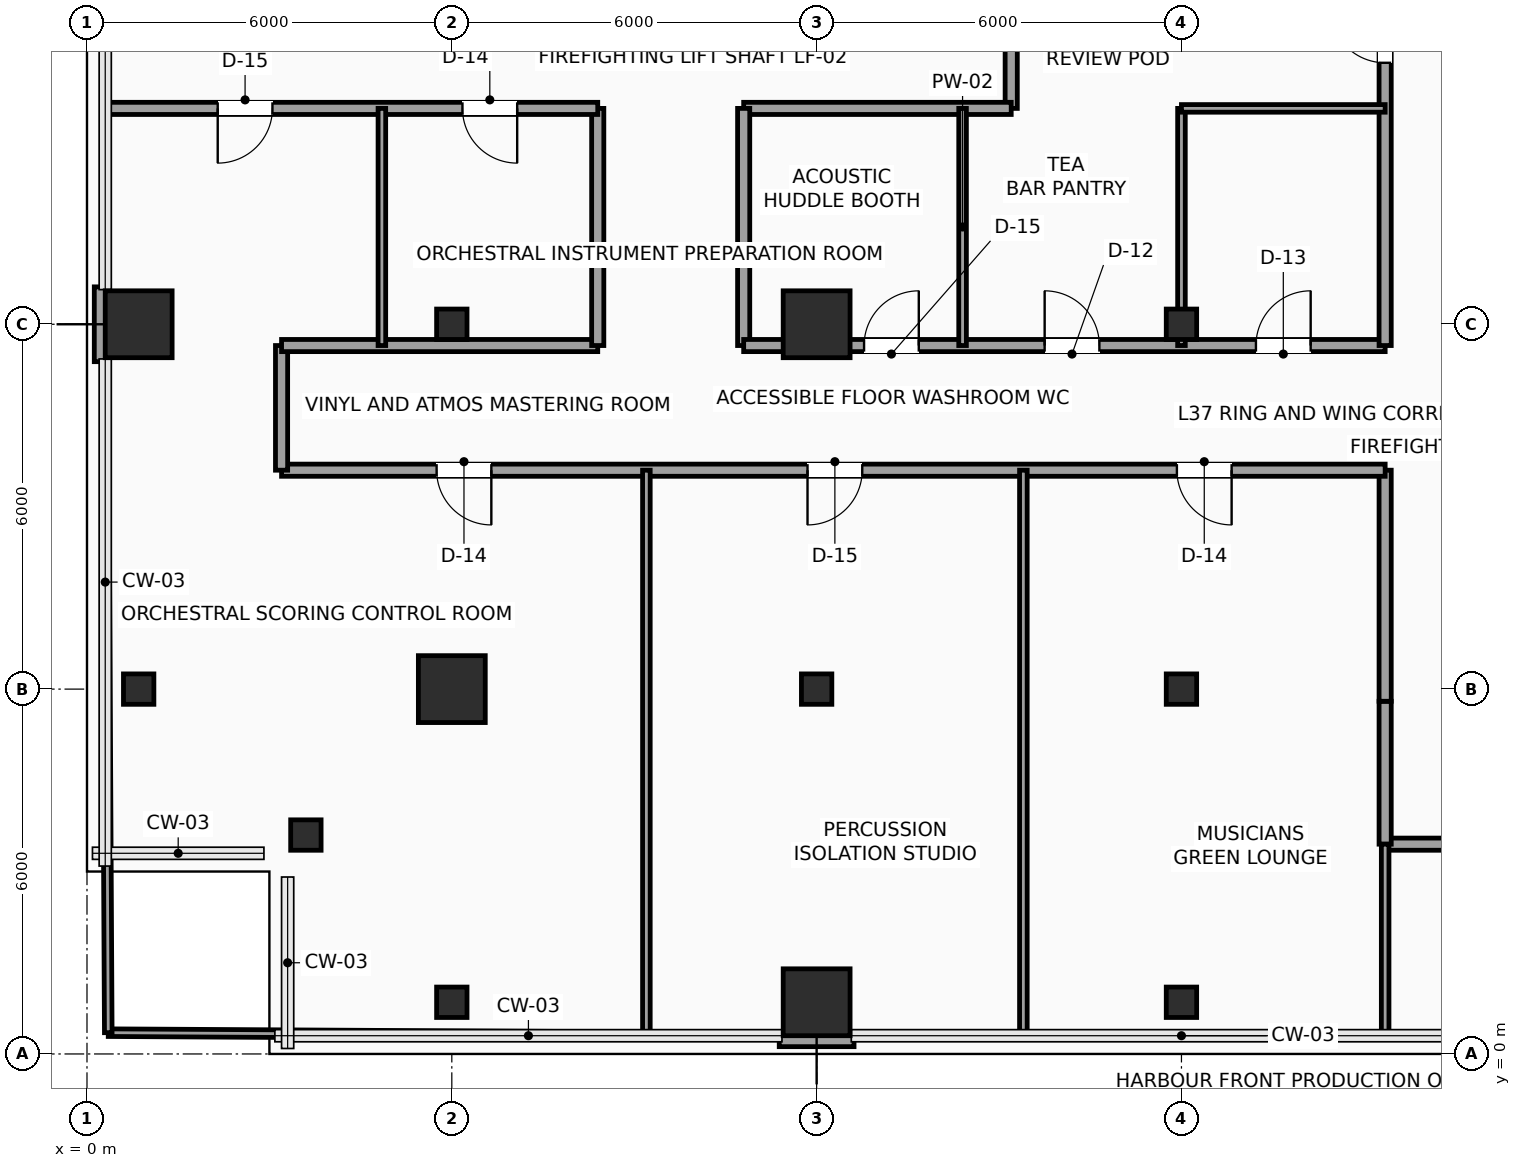
"""IFC4 building model, lengths in metres.
Left out: names, types, materials, properties, quantities, classifications, styles, units other than length and angle.
Written with IfcOpenShell. Run it as: python <this file> out.ifc"""

import sys

from ifc_helpers import new_model, si_unit, direction, frame, frame_2d, origin, origin_2d, place, context, subcontext, project, spatial, rectangle, hollow_rectangle, extrude, element, fill, save


model = new_model("IFC4")
c1 = context("Model", 3, precision=1e-05, world=origin(), true_north=direction((0.0, 1.0)))
c2 = subcontext(c1, "Body", "Model", "MODEL_VIEW")
j1 = project(units=[si_unit("LENGTHUNIT", "METRE"), si_unit("PLANEANGLEUNIT", "RADIAN")], contexts=[c1])
p1 = place(None, origin())
s1 = spatial("IfcSite", under=j1, at=p1, CompositionType="ELEMENT")
p2 = place(p1, origin())
s2 = spatial("IfcBuilding", under=s1, at=p2, CompositionType="ELEMENT")
p3 = place(p2, frame((0.0, 0.0, 153.15)))
s3 = spatial("IfcBuildingStorey", under=s2, at=p3, CompositionType="ELEMENT", Elevation=153.15)
for number, where, z_axis, x_axis in (
    (1, (3.6, 3.6, 0.0), (0.0, 0.0, 1.0), (1.0, 0.0, 0.0)),
    (2, (0.85, 6.0, 0.0), (0.0, 0.0, 1.0), (1.0, 0.0, 0.0)),
):
    element("IfcColumn", number, at=place(p3, frame(where, z_axis=z_axis, x_axis=x_axis)), inside=s3, PredefinedType="COLUMN", context=c2, shape_type="SweptSolid", body=[
        extrude(hollow_rectangle(XDim=0.5, YDim=0.5, WallThickness=0.025, InnerFilletRadius=0.025, OuterFilletRadius=0.04, at=origin_2d()), origin(), (0.0, 0.0, 1.0), 3.75),
    ])
p4 = place(p3, frame((0.85, 12.0, 0.0), z_axis=(0.0, 0.0, 1.0), x_axis=(1.0, 0.0, 0.0)))
e3 = element("IfcColumn", 3, at=p4, inside=s3, PredefinedType="COLUMN", context=c2, shape_type="SweptSolid", body=[
    extrude(rectangle(XDim=1.1, YDim=1.1, at=origin_2d()), origin(), (0.0, 0.0, 1.0), 3.75),
])
p5 = place(p3, frame((6.0, 0.85, 0.0), z_axis=(0.0, 0.0, 1.0), x_axis=(1.0, 0.0, 0.0)))
e4 = element("IfcColumn", 4, at=p5, inside=s3, PredefinedType="COLUMN", context=c2, shape_type="SweptSolid", body=[
    extrude(hollow_rectangle(XDim=0.5, YDim=0.5, WallThickness=0.025, InnerFilletRadius=0.025, OuterFilletRadius=0.04, at=origin_2d()), origin(), (0.0, 0.0, 1.0), 3.75),
])
p6 = place(p3, frame((6.0, 6.0, 0.0), z_axis=(0.0, 0.0, 1.0), x_axis=(1.0, 0.0, 0.0)))
e5 = element("IfcColumn", 5, at=p6, inside=s3, PredefinedType="COLUMN", context=c2, shape_type="SweptSolid", body=[
    extrude(rectangle(XDim=1.1, YDim=1.1, at=origin_2d()), origin(), (0.0, 0.0, 1.0), 3.75),
])
p7 = place(p3, frame((6.0, 12.0, 0.0), z_axis=(0.0, 0.0, 1.0), x_axis=(1.0, 0.0, 0.0)))
e6 = element("IfcColumn", 6, at=p7, inside=s3, PredefinedType="COLUMN", context=c2, shape_type="SweptSolid", body=[
    extrude(hollow_rectangle(XDim=0.5, YDim=0.5, WallThickness=0.025, InnerFilletRadius=0.025, OuterFilletRadius=0.04, at=origin_2d()), origin(), (0.0, 0.0, 1.0), 3.75),
])
p8 = place(p3, frame((12.0, 0.85, 0.0), z_axis=(0.0, 0.0, 1.0), x_axis=(1.0, 0.0, 0.0)))
e7 = element("IfcColumn", 7, at=p8, inside=s3, PredefinedType="COLUMN", context=c2, shape_type="SweptSolid", body=[
    extrude(rectangle(XDim=1.1, YDim=1.1, at=origin_2d()), origin(), (0.0, 0.0, 1.0), 3.75),
])
p9 = place(p3, frame((12.0, 6.0, 0.0), z_axis=(0.0, 0.0, 1.0), x_axis=(1.0, 0.0, 0.0)))
e8 = element("IfcColumn", 8, at=p9, inside=s3, PredefinedType="COLUMN", context=c2, shape_type="SweptSolid", body=[
    extrude(hollow_rectangle(XDim=0.5, YDim=0.5, WallThickness=0.025, InnerFilletRadius=0.025, OuterFilletRadius=0.04, at=origin_2d()), origin(), (0.0, 0.0, 1.0), 3.75),
])
p10 = place(p3, frame((12.0, 12.0, 0.0), z_axis=(0.0, 0.0, 1.0), x_axis=(1.0, 0.0, 0.0)))
e9 = element("IfcColumn", 9, at=p10, inside=s3, PredefinedType="COLUMN", context=c2, shape_type="SweptSolid", body=[
    extrude(rectangle(XDim=1.1, YDim=1.1, at=origin_2d()), origin(), (0.0, 0.0, 1.0), 3.75),
])
for number, where, z_axis, x_axis in (
    (10, (18.0, 0.85, 0.0), (0.0, 0.0, 1.0), (1.0, 0.0, 0.0)),
    (11, (18.0, 6.0, 0.0), (0.0, 0.0, 1.0), (1.0, 0.0, 0.0)),
    (12, (18.0, 12.0, 0.0), (0.0, 0.0, 1.0), (1.0, 0.0, 0.0)),
):
    element("IfcColumn", number, at=place(p3, frame(where, z_axis=z_axis, x_axis=x_axis)), inside=s3, PredefinedType="COLUMN", context=c2, shape_type="SweptSolid", body=[
        extrude(hollow_rectangle(XDim=0.5, YDim=0.5, WallThickness=0.025, InnerFilletRadius=0.025, OuterFilletRadius=0.04, at=origin_2d()), origin(), (0.0, 0.0, 1.0), 3.75),
    ])
for number, where, z_axis, x_axis in (
    (13, (0.24, 11.385, 0.0), (0.0, 0.0, 1.0), (0.0, 1.0, 0.0)),
    (14, (12.615, 0.24, 0.0), (0.0, 0.0, 1.0), (-1.0, 0.0, 0.0)),
):
    element("IfcWall", number, at=place(p3, frame(where, z_axis=z_axis, x_axis=x_axis)), inside=s3, PredefinedType="SOLIDWALL", context=c2, shape_type="SweptSolid", body=[
        extrude(rectangle(XDim=1.23, YDim=0.24, at=frame_2d((0.615, 0.0))), origin(), (0.0, 0.0, 1.0), 3.525),
    ])
p11 = place(p3, frame((23.95, 3.45, 0.0), z_axis=(0.0, 0.0, 1.0), x_axis=(-1.0, 0.0, 0.0)))
e15 = element("IfcWall", 15, at=p11, inside=s3, PredefinedType="SOLIDWALL", context=c2, shape_type="SweptSolid", body=[
    extrude(rectangle(XDim=2.6, YDim=0.2, at=frame_2d((1.3, 0.0))), origin(), (0.0, 0.0, 1.0), 3.067),
])
p12 = place(p3, frame((21.35, 3.45, 0.0), z_axis=(0.0, 0.0, 1.0), x_axis=(0.0, 1.0, 0.0)))
e16 = element("IfcWall", 16, at=p12, inside=s3, PredefinedType="SOLIDWALL", context=c2, shape_type="SweptSolid", body=[
    extrude(rectangle(XDim=2.35, YDim=0.2, at=frame_2d((1.175, 0.0))), origin(), (0.0, 0.0, 1.0), 3.525),
])
p13 = place(p3, frame((21.35, 5.8, 0.0), z_axis=(0.0, 0.0, 1.0), x_axis=(0.0, 1.0, 0.0)))
e17 = element("IfcWall", 17, at=p13, inside=s3, PredefinedType="SOLIDWALL", context=c2, shape_type="SweptSolid", body=[
    extrude(rectangle(XDim=3.8, YDim=0.2, at=frame_2d((1.9, 0.0))), origin(), (0.0, 0.0, 1.0), 3.525),
])
p14 = place(p3, frame((21.35, 9.6, 0.0), z_axis=(0.0, 0.0, 1.0), x_axis=(-1.0, 0.0, 0.0)))
e18 = element("IfcWall", 18, at=p14, inside=s3, PredefinedType="SOLIDWALL", context=c2, shape_type="SweptSolid", body=[
    extrude(rectangle(XDim=18.15, YDim=0.2, at=frame_2d((9.075, 0.0))), origin(), (0.0, 0.0, 1.0), 3.525),
])
p15 = place(p14, frame((14.7, 0.0, 0.0)))
e19 = element("IfcOpeningElement", 19, at=p15, cuts=e18, PredefinedType="OPENING", context=c2, shape_type="SweptSolid", body=[
    extrude(rectangle(XDim=0.9, YDim=2.1, at=frame_2d((0.45, 1.05))), frame((0.0, 0.11, 0.0), z_axis=(0.0, -1.0, 0.0), x_axis=(1.0, 0.0, 0.0)), (0.0, 0.0, 1.0), 0.22),
])
p16 = place(p14, frame((8.6, 0.0, 0.0)))
e20 = element("IfcOpeningElement", 20, at=p16, cuts=e18, PredefinedType="OPENING", context=c2, shape_type="SweptSolid", body=[
    extrude(rectangle(XDim=0.9, YDim=2.1, at=frame_2d((0.45, 1.05))), frame((0.0, 0.11, 0.0), z_axis=(0.0, -1.0, 0.0), x_axis=(1.0, 0.0, 0.0)), (0.0, 0.0, 1.0), 0.22),
])
p17 = place(p14, frame((2.525, 0.0, 0.0)))
e21 = element("IfcOpeningElement", 21, at=p17, cuts=e18, PredefinedType="OPENING", context=c2, shape_type="SweptSolid", body=[
    extrude(rectangle(XDim=0.9, YDim=2.1, at=frame_2d((0.45, 1.05))), frame((0.0, 0.11, 0.0), z_axis=(0.0, -1.0, 0.0), x_axis=(1.0, 0.0, 0.0)), (0.0, 0.0, 1.0), 0.22),
])
p18 = place(p3, frame((3.2, 9.6, 0.0), z_axis=(0.0, 0.0, 1.0), x_axis=(0.0, 1.0, 0.0)))
e22 = element("IfcWall", 22, at=p18, inside=s3, PredefinedType="SOLIDWALL", context=c2, shape_type="SweptSolid", body=[
    extrude(rectangle(XDim=2.05, YDim=0.2, at=frame_2d((1.025, 0.0))), origin(), (0.0, 0.0, 1.0), 3.525),
])
p19 = place(p3, frame((3.2, 11.65, 0.0), z_axis=(0.0, 0.0, 1.0), x_axis=(1.0, 0.0, 0.0)))
e23 = element("IfcWall", 23, at=p19, inside=s3, PredefinedType="SOLIDWALL", context=c2, shape_type="SweptSolid", body=[
    extrude(rectangle(XDim=5.2, YDim=0.2, at=frame_2d((2.6, 0.0))), origin(), (0.0, 0.0, 1.0), 3.525),
])
p20 = place(p3, frame((8.4, 11.65, 0.0), z_axis=(0.0, 0.0, 1.0), x_axis=(0.0, 1.0, 0.0)))
e24 = element("IfcWall", 24, at=p20, inside=s3, PredefinedType="SOLIDWALL", context=c2, shape_type="SweptSolid", body=[
    extrude(rectangle(XDim=3.9, YDim=0.2, at=frame_2d((1.95, 0.0))), origin(), (0.0, 0.0, 1.0), 3.525),
])
p21 = place(p3, frame((8.4, 15.55, 0.0), z_axis=(0.0, 0.0, 1.0), x_axis=(-1.0, 0.0, 0.0)))
e25 = element("IfcWall", 25, at=p21, inside=s3, PredefinedType="SOLIDWALL", context=c2, shape_type="SweptSolid", body=[
    extrude(rectangle(XDim=8.1, YDim=0.2, at=frame_2d((4.05, 0.0))), origin(), (0.0, 0.0, 1.0), 3.525),
])
p22 = place(p21, frame((5.35, 0.0, 0.0)))
e26 = element("IfcOpeningElement", 26, at=p22, cuts=e25, PredefinedType="OPENING", context=c2, shape_type="SweptSolid", body=[
    extrude(rectangle(XDim=0.9, YDim=2.1, at=frame_2d((0.45, 1.05))), frame((0.0, 0.11, 0.0), z_axis=(0.0, -1.0, 0.0), x_axis=(1.0, 0.0, 0.0)), (0.0, 0.0, 1.0), 0.22),
])
p23 = place(p21, frame((1.325, 0.0, 0.0)))
e27 = element("IfcOpeningElement", 27, at=p23, cuts=e25, PredefinedType="OPENING", context=c2, shape_type="SweptSolid", body=[
    extrude(rectangle(XDim=0.9, YDim=2.1, at=frame_2d((0.45, 1.05))), frame((0.0, 0.11, 0.0), z_axis=(0.0, -1.0, 0.0), x_axis=(1.0, 0.0, 0.0)), (0.0, 0.0, 1.0), 0.22),
])
p24 = place(p3, frame((15.2, 17.95, 0.0), z_axis=(0.0, 0.0, 1.0), x_axis=(0.0, -1.0, 0.0)))
e28 = element("IfcWall", 28, at=p24, inside=s3, PredefinedType="SOLIDWALL", context=c2, shape_type="SweptSolid", body=[
    extrude(rectangle(XDim=2.4, YDim=0.2, at=frame_2d((1.2, 0.0))), origin(), (0.0, 0.0, 1.0), 3.525),
])
p25 = place(p3, frame((15.2, 15.55, 0.0), z_axis=(0.0, 0.0, 1.0), x_axis=(-1.0, 0.0, 0.0)))
e29 = element("IfcWall", 29, at=p25, inside=s3, PredefinedType="SOLIDWALL", context=c2, shape_type="SweptSolid", body=[
    extrude(rectangle(XDim=4.4, YDim=0.2, at=frame_2d((2.2, 0.0))), origin(), (0.0, 0.0, 1.0), 3.525),
])
p26 = place(p3, frame((10.8, 15.55, 0.0), z_axis=(0.0, 0.0, 1.0), x_axis=(0.0, -1.0, 0.0)))
e30 = element("IfcWall", 30, at=p26, inside=s3, PredefinedType="SOLIDWALL", context=c2, shape_type="SweptSolid", body=[
    extrude(rectangle(XDim=3.9, YDim=0.2, at=frame_2d((1.95, 0.0))), origin(), (0.0, 0.0, 1.0), 3.525),
])
p27 = place(p3, frame((10.8, 11.65, 0.0), z_axis=(0.0, 0.0, 1.0), x_axis=(1.0, 0.0, 0.0)))
e31 = element("IfcWall", 31, at=p27, inside=s3, PredefinedType="SOLIDWALL", context=c2, shape_type="SweptSolid", body=[
    extrude(rectangle(XDim=10.55, YDim=0.2, at=frame_2d((5.275, 0.0))), origin(), (0.0, 0.0, 1.0), 3.525),
])
p28 = place(p27, frame((1.98, 0.0, 0.0)))
e32 = element("IfcOpeningElement", 32, at=p28, cuts=e31, PredefinedType="OPENING", context=c2, shape_type="SweptSolid", body=[
    extrude(rectangle(XDim=0.9, YDim=2.1, at=frame_2d((0.45, 1.05))), frame((0.0, 0.11, 0.0), z_axis=(0.0, -1.0, 0.0), x_axis=(1.0, 0.0, 0.0)), (0.0, 0.0, 1.0), 0.22),
])
p29 = place(p27, frame((4.95, 0.0, 0.0)))
e33 = element("IfcOpeningElement", 33, at=p29, cuts=e31, PredefinedType="OPENING", context=c2, shape_type="SweptSolid", body=[
    extrude(rectangle(XDim=0.9, YDim=2.1, at=frame_2d((0.45, 1.05))), frame((0.0, 0.11, 0.0), z_axis=(0.0, -1.0, 0.0), x_axis=(1.0, 0.0, 0.0)), (0.0, 0.0, 1.0), 0.22),
])
p30 = place(p27, frame((8.425, 0.0, 0.0)))
e34 = element("IfcOpeningElement", 34, at=p30, cuts=e31, PredefinedType="OPENING", context=c2, shape_type="SweptSolid", body=[
    extrude(rectangle(XDim=0.9, YDim=2.1, at=frame_2d((0.45, 1.05))), frame((0.0, 0.11, 0.0), z_axis=(0.0, -1.0, 0.0), x_axis=(1.0, 0.0, 0.0)), (0.0, 0.0, 1.0), 0.22),
])
p31 = place(p3, frame((21.35, 11.65, 0.0), z_axis=(0.0, 0.0, 1.0), x_axis=(0.0, 1.0, 0.0)))
e35 = element("IfcWall", 35, at=p31, inside=s3, PredefinedType="SOLIDWALL", context=c2, shape_type="SweptSolid", body=[
    extrude(rectangle(XDim=18.6, YDim=0.2, at=frame_2d((9.3, 0.0))), origin(), (0.0, 0.0, 1.0), 3.525),
])
p32 = place(p31, frame((7.2, 0.0, 0.0)))
e36 = element("IfcOpeningElement", 36, at=p32, cuts=e35, PredefinedType="OPENING", context=c2, shape_type="SweptSolid", body=[
    extrude(rectangle(XDim=0.95, YDim=2.15, at=frame_2d((0.475, 1.075))), frame((0.0, 0.11, 0.0), z_axis=(0.0, -1.0, 0.0), x_axis=(1.0, 0.0, 0.0)), (0.0, 0.0, 1.0), 0.22),
])
p33 = place(p31, frame((10.45, 0.0, 0.0)))
e37 = element("IfcOpeningElement", 37, at=p33, cuts=e35, PredefinedType="OPENING", context=c2, shape_type="SweptSolid", body=[
    extrude(rectangle(XDim=0.9, YDim=2.1, at=frame_2d((0.45, 1.05))), frame((0.0, 0.11, 0.0), z_axis=(0.0, -1.0, 0.0), x_axis=(1.0, 0.0, 0.0)), (0.0, 0.0, 1.0), 0.22),
])
p34 = place(p31, frame((13.9, 0.0, 0.0)))
e38 = element("IfcOpeningElement", 38, at=p34, cuts=e35, PredefinedType="OPENING", context=c2, shape_type="SweptSolid", body=[
    extrude(rectangle(XDim=0.95, YDim=2.15, at=frame_2d((0.475, 1.075))), frame((0.0, 0.11, 0.0), z_axis=(0.0, -1.0, 0.0), x_axis=(1.0, 0.0, 0.0)), (0.0, 0.0, 1.0), 0.22),
])
p35 = place(p31, frame((4.65, 0.0, 0.0)))
e39 = element("IfcOpeningElement", 39, at=p35, cuts=e35, PredefinedType="OPENING", context=c2, shape_type="SweptSolid", body=[
    extrude(rectangle(XDim=0.9, YDim=2.1, at=frame_2d((0.45, 1.05))), frame((0.0, 0.11, 0.0), z_axis=(0.0, -1.0, 0.0), x_axis=(1.0, 0.0, 0.0)), (0.0, 0.0, 1.0), 0.22),
])
p36 = place(p3, frame((14.4, 11.65, 0.0), z_axis=(0.0, 0.0, 1.0), x_axis=(0.0, 1.0, 0.0)))
e40 = element("IfcWall", 40, at=p36, inside=s3, PredefinedType="PARTITIONING", context=c2, shape_type="SweptSolid", body=[
    extrude(rectangle(XDim=3.9, YDim=0.125, at=frame_2d((1.95, 0.0))), origin(), (0.0, 0.0, 1.0), 3.525),
])
p37 = place(p3, frame((18.0, 11.65, 0.0), z_axis=(0.0, 0.0, 1.0), x_axis=(0.0, 1.0, 0.0)))
e41 = element("IfcWall", 41, at=p37, inside=s3, PredefinedType="PARTITIONING", context=c2, shape_type="SweptSolid", body=[
    extrude(rectangle(XDim=3.9, YDim=0.125, at=frame_2d((1.95, 0.0))), origin(), (0.0, 0.0, 1.0), 3.017),
])
p38 = place(p3, frame((18.0, 15.55, 0.0), z_axis=(0.0, 0.0, 1.0), x_axis=(1.0, 0.0, 0.0)))
e42 = element("IfcWall", 42, at=p38, inside=s3, PredefinedType="PARTITIONING", context=c2, shape_type="SweptSolid", body=[
    extrude(rectangle(XDim=3.35, YDim=0.125, at=frame_2d((1.675, 0.0))), origin(), (0.0, 0.0, 1.0), 3.525),
])
p39 = place(p3, frame((21.35, 0.3, 0.0), z_axis=(0.0, 0.0, 1.0), x_axis=(0.0, 1.0, 0.0)))
e43 = element("IfcWall", 43, at=p39, inside=s3, PredefinedType="PARTITIONING", context=c2, shape_type="SweptSolid", body=[
    extrude(rectangle(XDim=3.15, YDim=0.125, at=frame_2d((1.575, 0.0))), origin(), (0.0, 0.0, 1.0), 3.525),
])
p40 = place(p3, frame((0.35, 0.35, 0.0), z_axis=(0.0, 0.0, 1.0), x_axis=(0.999984009014, -0.005655237989, 0.0)))
e44 = element("IfcWall", 44, at=p40, inside=s3, PredefinedType="PARTITIONING", context=c2, shape_type="SweptSolid", body=[
    extrude(rectangle(XDim=8.85, YDim=0.125, at=frame_2d((4.425, 0.0))), origin(), (0.0, 0.0, 1.0), 3.525),
])
p41 = place(p3, frame((0.35, 0.35, 0.0), z_axis=(0.0, 0.0, 1.0), x_axis=(-0.005410604923, 0.99998536257, 0.0)))
e45 = element("IfcWall", 45, at=p41, inside=s3, PredefinedType="PARTITIONING", context=c2, shape_type="SweptSolid", body=[
    extrude(rectangle(XDim=9.25, YDim=0.125, at=frame_2d((4.625, 0.0))), origin(), (0.0, 0.0, 1.0), 3.525),
])
for number, where, z_axis, x_axis in (
    (46, (9.2, 0.3, 0.0), (0.0, 0.0, 1.0), (0.0, 1.0, 0.0)),
    (47, (15.4, 0.3, 0.0), (0.0, 0.0, 1.0), (0.0, 1.0, 0.0)),
):
    element("IfcWall", number, at=place(p3, frame(where, z_axis=z_axis, x_axis=x_axis)), inside=s3, PredefinedType="PARTITIONING", context=c2, shape_type="SweptSolid", body=[
        extrude(rectangle(XDim=9.3, YDim=0.125, at=frame_2d((4.65, 0.0))), origin(), (0.0, 0.0, 1.0), 3.525),
    ])
p42 = place(p3, frame((4.85, 11.65, 0.0), z_axis=(0.0, 0.0, 1.0), x_axis=(0.0, 1.0, 0.0)))
e48 = element("IfcWall", 48, at=p42, inside=s3, PredefinedType="PARTITIONING", context=c2, shape_type="SweptSolid", body=[
    extrude(rectangle(XDim=3.9, YDim=0.125, at=frame_2d((1.95, 0.0))), origin(), (0.0, 0.0, 1.0), 3.525),
])
p43 = place(p15, origin())
e49 = element("IfcDoor", 49, at=p43, inside=s3, OperationType="SINGLE_SWING_LEFT", PredefinedType="DOOR", context=c2, shape_type="SweptSolid", body=[
    extrude(rectangle(XDim=0.9, YDim=2.1, at=frame_2d((0.45, 1.05))), frame((0.0, 0.025, 0.0), z_axis=(0.0, -1.0, 0.0), x_axis=(1.0, 0.0, 0.0)), (0.0, 0.0, 1.0), 0.05),
])
fill(e19, e49)
p44 = place(p16, origin())
e50 = element("IfcDoor", 50, at=p44, inside=s3, OperationType="SINGLE_SWING_RIGHT", PredefinedType="DOOR", context=c2, shape_type="SweptSolid", body=[
    extrude(rectangle(XDim=0.9, YDim=2.1, at=frame_2d((0.45, 1.05))), frame((0.0, 0.025, 0.0), z_axis=(0.0, -1.0, 0.0), x_axis=(1.0, 0.0, 0.0)), (0.0, 0.0, 1.0), 0.05),
])
fill(e20, e50)
p45 = place(p17, origin())
e51 = element("IfcDoor", 51, at=p45, inside=s3, OperationType="SINGLE_SWING_LEFT", PredefinedType="DOOR", context=c2, shape_type="SweptSolid", body=[
    extrude(rectangle(XDim=0.9, YDim=2.1, at=frame_2d((0.45, 1.05))), frame((0.0, 0.025, 0.0), z_axis=(0.0, -1.0, 0.0), x_axis=(1.0, 0.0, 0.0)), (0.0, 0.0, 1.0), 0.05),
])
fill(e21, e51)
p46 = place(p22, origin())
e52 = element("IfcDoor", 52, at=p46, inside=s3, OperationType="SINGLE_SWING_RIGHT", PredefinedType="DOOR", context=c2, shape_type="SweptSolid", body=[
    extrude(rectangle(XDim=0.9, YDim=2.1, at=frame_2d((0.45, 1.05))), frame((0.0, 0.025, 0.0), z_axis=(0.0, -1.0, 0.0), x_axis=(1.0, 0.0, 0.0)), (0.0, 0.0, 1.0), 0.05),
])
fill(e26, e52)
p47 = place(p23, origin())
e53 = element("IfcDoor", 53, at=p47, inside=s3, OperationType="SINGLE_SWING_LEFT", PredefinedType="DOOR", context=c2, shape_type="SweptSolid", body=[
    extrude(rectangle(XDim=0.9, YDim=2.1, at=frame_2d((0.45, 1.05))), frame((0.0, 0.025, 0.0), z_axis=(0.0, -1.0, 0.0), x_axis=(1.0, 0.0, 0.0)), (0.0, 0.0, 1.0), 0.05),
])
fill(e27, e53)
p48 = place(p28, origin())
e54 = element("IfcDoor", 54, at=p48, inside=s3, OperationType="SINGLE_SWING_RIGHT", PredefinedType="DOOR", context=c2, shape_type="SweptSolid", body=[
    extrude(rectangle(XDim=0.9, YDim=2.1, at=frame_2d((0.45, 1.05))), frame((0.0, 0.025, 0.0), z_axis=(0.0, -1.0, 0.0), x_axis=(1.0, 0.0, 0.0)), (0.0, 0.0, 1.0), 0.05),
])
fill(e32, e54)
p49 = place(p29, origin())
e55 = element("IfcDoor", 55, at=p49, inside=s3, OperationType="SINGLE_SWING_LEFT", PredefinedType="DOOR", context=c2, shape_type="SweptSolid", body=[
    extrude(rectangle(XDim=0.9, YDim=2.1, at=frame_2d((0.45, 1.05))), frame((0.0, 0.025, 0.0), z_axis=(0.0, -1.0, 0.0), x_axis=(1.0, 0.0, 0.0)), (0.0, 0.0, 1.0), 0.05),
])
fill(e33, e55)
p50 = place(p30, origin())
e56 = element("IfcDoor", 56, at=p50, inside=s3, OperationType="SINGLE_SWING_RIGHT", PredefinedType="DOOR", context=c2, shape_type="SweptSolid", body=[
    extrude(rectangle(XDim=0.9, YDim=2.1, at=frame_2d((0.45, 1.05))), frame((0.0, 0.025, 0.0), z_axis=(0.0, -1.0, 0.0), x_axis=(1.0, 0.0, 0.0)), (0.0, 0.0, 1.0), 0.05),
])
fill(e34, e56)
p51 = place(p35, origin())
e57 = element("IfcDoor", 57, at=p51, inside=s3, OperationType="SINGLE_SWING_RIGHT", PredefinedType="DOOR", context=c2, shape_type="SweptSolid", body=[
    extrude(rectangle(XDim=0.9, YDim=2.1, at=frame_2d((0.45, 1.05))), frame((0.0, 0.025, 0.0), z_axis=(0.0, -1.0, 0.0), x_axis=(1.0, 0.0, 0.0)), (0.0, 0.0, 1.0), 0.05),
])
fill(e39, e57)
save(model, sys.argv[1])
